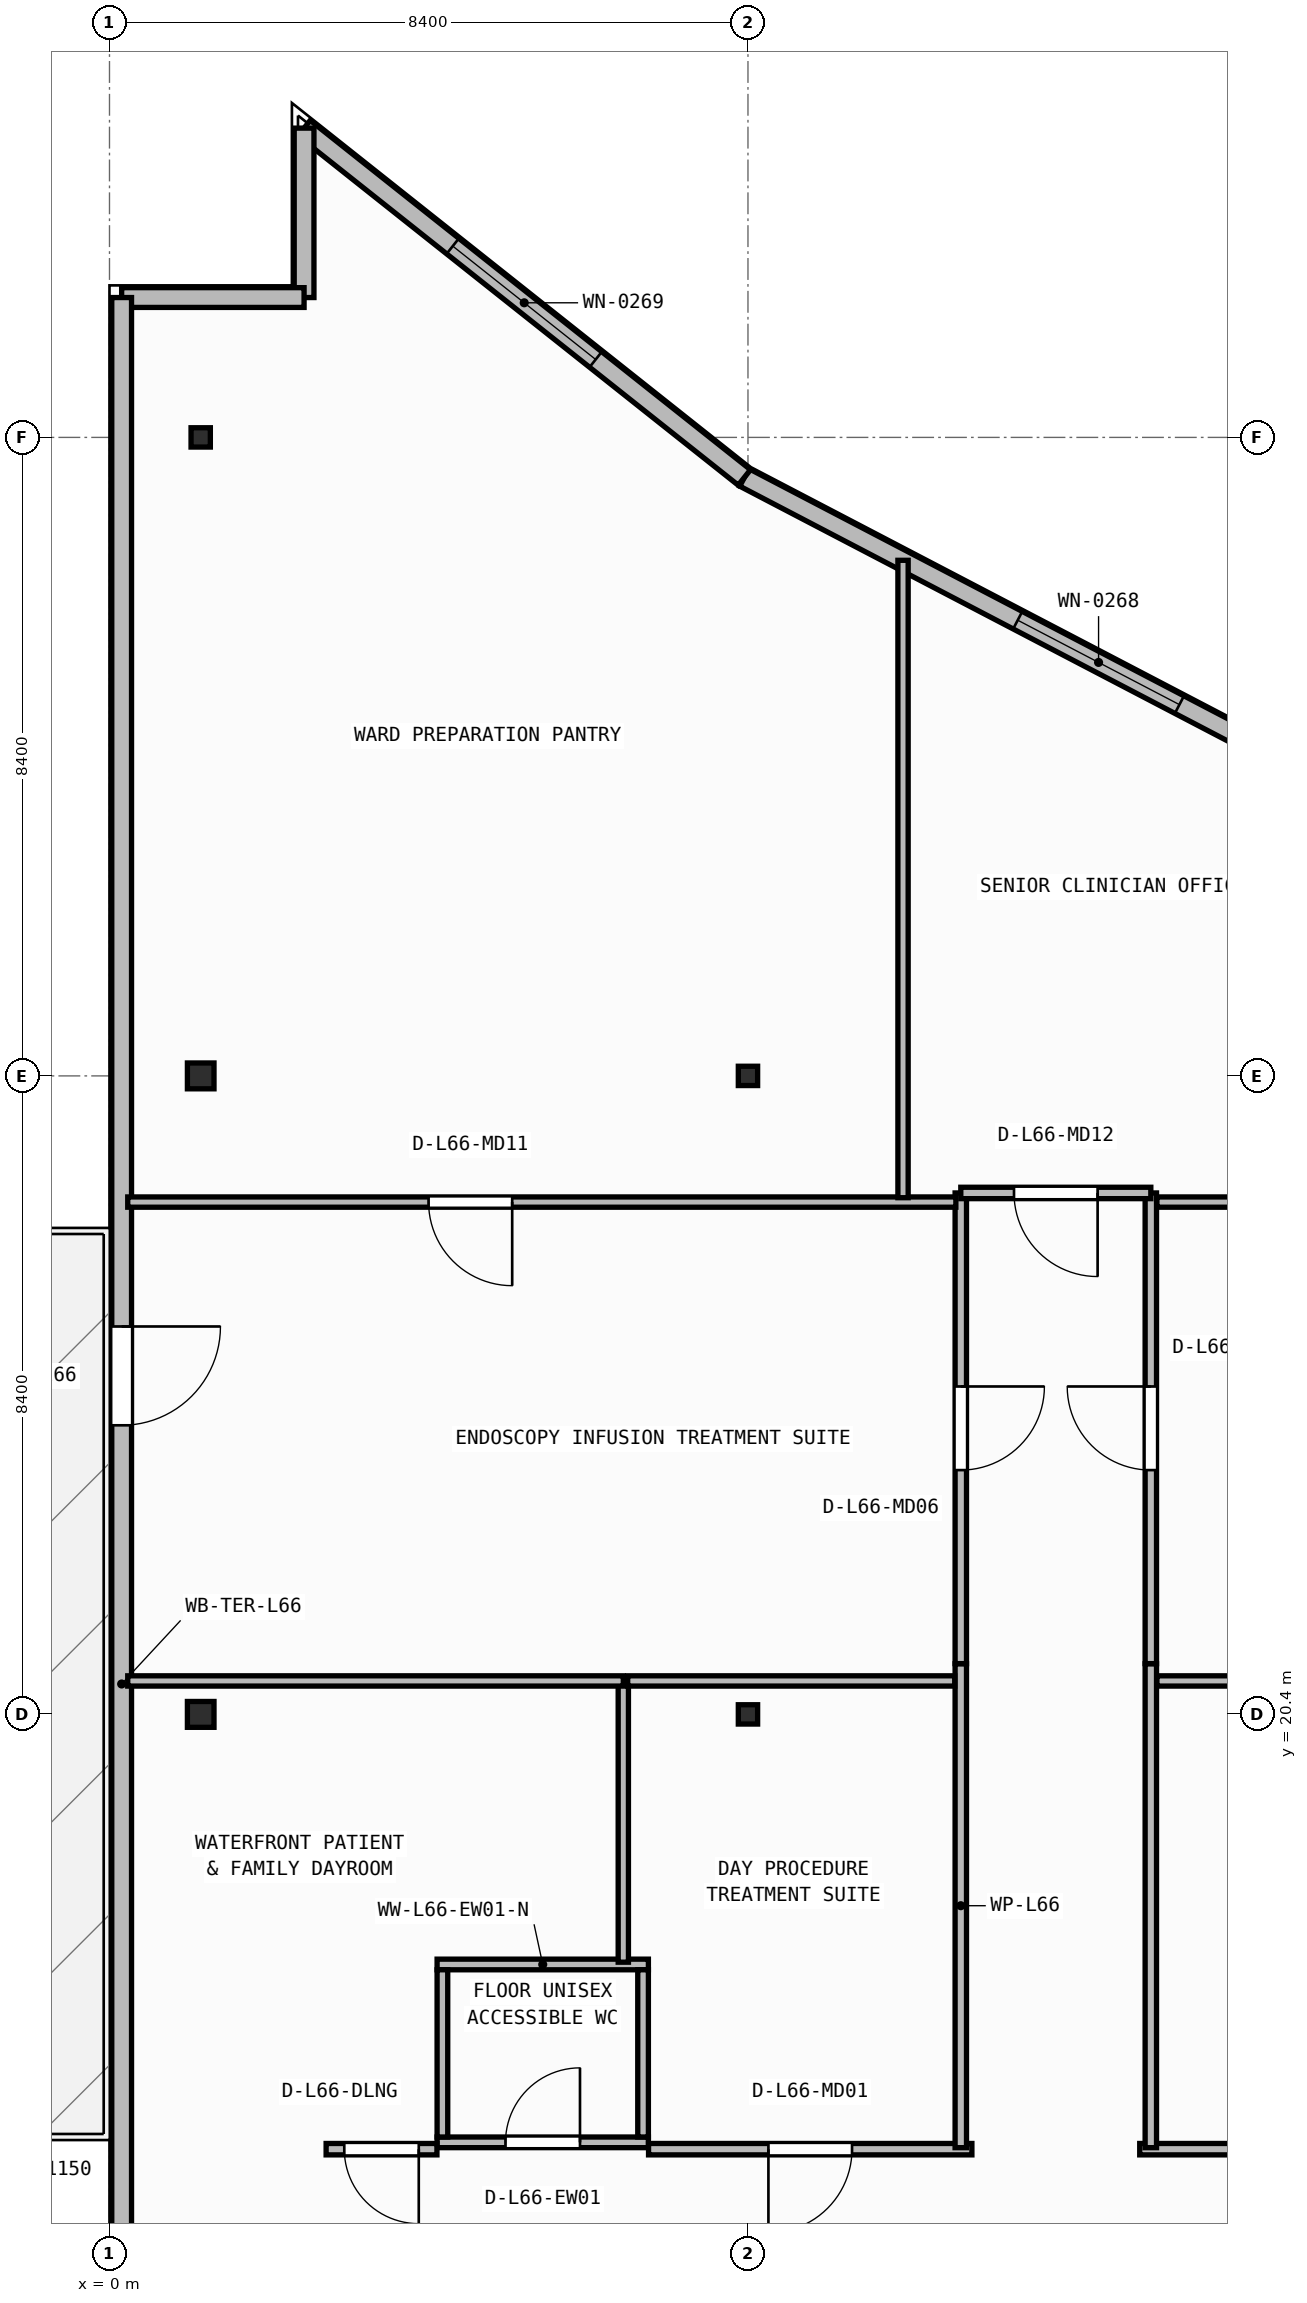
"""IFC4 building model, lengths in metres.
Left out: names, types, materials, properties, quantities, classifications, styles, units other than length and angle.
Written with IfcOpenShell. Run it as: python <this file> out.ifc"""

import sys

from ifc_helpers import new_model, si_unit, direction, frame, frame_2d, origin, origin_2d, place, context, subcontext, project, spatial, rectangle, i_section, extrude, element, fill, save


model = new_model("IFC4")
c1 = context("Model", 3, precision=1e-05, world=origin(), true_north=direction((0.0, 1.0)))
c2 = subcontext(c1, "Body", "Model", "MODEL_VIEW")
j1 = project(units=[si_unit("LENGTHUNIT", "METRE"), si_unit("PLANEANGLEUNIT", "RADIAN")], contexts=[c1])
p1 = place(None, origin())
s1 = spatial("IfcSite", under=j1, at=p1, CompositionType="ELEMENT")
p2 = place(p1, origin())
s2 = spatial("IfcBuilding", under=s1, at=p2, CompositionType="ELEMENT")
p3 = place(p2, frame((0.0, 0.0, 268.4)))
s3 = spatial("IfcBuildingStorey", under=s2, at=p3, CompositionType="ELEMENT", Elevation=268.4)
p4 = place(p3, frame((1.2, 20.4, 0.0), z_axis=(0.0, 0.0, 1.0), x_axis=(1.0, 0.0, 0.0)))
e1 = element("IfcColumn", 1, at=p4, inside=s3, PredefinedType="COLUMN", context=c2, shape_type="SweptSolid", body=[
    extrude(i_section(OverallWidth=0.35, OverallDepth=0.34, WebThickness=0.016, FlangeThickness=0.028, at=origin_2d()), origin(), (0.0, 0.0, 1.0), 3.95),
])
p5 = place(p3, frame((8.4, 20.4, 0.0), z_axis=(0.0, 0.0, 1.0), x_axis=(1.0, 0.0, 0.0)))
e2 = element("IfcColumn", 2, at=p5, inside=s3, PredefinedType="COLUMN", context=c2, shape_type="SweptSolid", body=[
    extrude(i_section(OverallWidth=0.254, OverallDepth=0.254, WebThickness=0.009, FlangeThickness=0.014, FilletRadius=0.013, at=origin_2d()), origin(), (0.0, 0.0, 1.0), 3.95),
])
p6 = place(p3, frame((1.2, 28.8, 0.0), z_axis=(0.0, 0.0, 1.0), x_axis=(1.0, 0.0, 0.0)))
e3 = element("IfcColumn", 3, at=p6, inside=s3, PredefinedType="COLUMN", context=c2, shape_type="SweptSolid", body=[
    extrude(i_section(OverallWidth=0.35, OverallDepth=0.34, WebThickness=0.016, FlangeThickness=0.028, at=origin_2d()), origin(), (0.0, 0.0, 1.0), 3.95),
])
for number, where, z_axis, x_axis in (
    (4, (8.4, 28.8, 0.0), (0.0, 0.0, 1.0), (1.0, 0.0, 0.0)),
    (5, (1.2, 37.2, 0.0), (0.0, 0.0, 1.0), (1.0, 0.0, 0.0)),
):
    element("IfcColumn", number, at=place(p3, frame(where, z_axis=z_axis, x_axis=x_axis)), inside=s3, PredefinedType="COLUMN", context=c2, shape_type="SweptSolid", body=[
        extrude(i_section(OverallWidth=0.254, OverallDepth=0.254, WebThickness=0.009, FlangeThickness=0.014, FilletRadius=0.013, at=origin_2d()), origin(), (0.0, 0.0, 1.0), 3.95),
    ])
p7 = place(p3, frame((17.673, 31.806, 0.0), z_axis=(0.0, 0.0, 1.0), x_axis=(-0.886426635565, 0.462869117311, 0.0)))
e6 = element("IfcWall", 6, at=p7, inside=s3, PredefinedType="STANDARD", context=c2, shape_type="SweptSolid", body=[
    extrude(rectangle(XDim=10.514, YDim=0.26, at=frame_2d((5.257, 0.0))), origin(), (0.0, 0.0, 1.0), 3.71),
])
p8 = place(p7, frame((4.057, 0.0, 0.9)))
e7 = element("IfcOpeningElement", 7, at=p8, cuts=e6, PredefinedType="OPENING", context=c2, shape_type="SweptSolid", body=[
    extrude(rectangle(XDim=2.4, YDim=1.65, at=frame_2d((1.2, 0.825))), frame((0.0, 0.14, 0.0), z_axis=(0.0, -1.0, 0.0), x_axis=(1.0, 0.0, 0.0)), (0.0, 0.0, 1.0), 0.28),
])
p9 = place(p3, frame((8.353, 36.673, 0.0), z_axis=(0.0, 0.0, 1.0), x_axis=(-0.783387911746, 0.621533088203, 0.0)))
e8 = element("IfcWall", 8, at=p9, inside=s3, PredefinedType="STANDARD", context=c2, shape_type="SweptSolid", body=[
    extrude(rectangle(XDim=7.394, YDim=0.26, at=frame_2d((3.697, 0.0))), origin(), (0.0, 0.0, 1.0), 3.71),
])
p10 = place(p9, frame((2.497, 0.0, 0.9)))
e9 = element("IfcOpeningElement", 9, at=p10, cuts=e8, PredefinedType="OPENING", context=c2, shape_type="SweptSolid", body=[
    extrude(rectangle(XDim=2.4, YDim=1.65, at=frame_2d((1.2, 0.825))), frame((0.0, 0.14, 0.0), z_axis=(0.0, -1.0, 0.0), x_axis=(1.0, 0.0, 0.0)), (0.0, 0.0, 1.0), 0.28),
])
p11 = place(p3, frame((2.56, 41.269, 0.0), z_axis=(0.0, 0.0, 1.0), x_axis=(0.0, -1.0, 0.0)))
e10 = element("IfcWall", 10, at=p11, inside=s3, PredefinedType="STANDARD", context=c2, shape_type="SweptSolid", body=[
    extrude(rectangle(XDim=2.229, YDim=0.26, at=frame_2d((1.114, 0.0))), origin(), (0.0, 0.0, 1.0), 3.71),
])
p12 = place(p3, frame((2.56, 39.04, 0.0), z_axis=(0.0, 0.0, 1.0), x_axis=(-1.0, 0.0, 0.0)))
e11 = element("IfcWall", 11, at=p12, inside=s3, PredefinedType="STANDARD", context=c2, shape_type="SweptSolid", body=[
    extrude(rectangle(XDim=2.4, YDim=0.26, at=frame_2d((1.2, 0.0))), origin(), (0.0, 0.0, 1.0), 3.71),
])
p13 = place(p3, frame((0.16, 39.04, 0.0), z_axis=(0.0, 0.0, 1.0), x_axis=(0.0, -1.0, 0.0)))
e12 = element("IfcWall", 12, at=p13, inside=s3, PredefinedType="STANDARD", context=c2, shape_type="SweptSolid", body=[
    extrude(rectangle(XDim=36.48, YDim=0.26, at=frame_2d((18.24, 0.0))), origin(), (0.0, 0.0, 1.0), 3.71),
])
p14 = place(p13, frame((13.537, 0.0, 0.0)))
e13 = element("IfcOpeningElement", 13, at=p14, cuts=e12, PredefinedType="OPENING", context=c2, shape_type="SweptSolid", body=[
    extrude(rectangle(XDim=1.3, YDim=2.15, at=frame_2d((0.65, 1.075))), frame((0.0, 0.14, 0.0), z_axis=(0.0, -1.0, 0.0), x_axis=(1.0, 0.0, 0.0)), (0.0, 0.0, 1.0), 0.28),
])
p15 = place(p3, frame((4.31, 14.77, 0.0), z_axis=(0.0, 0.0, 1.0), x_axis=(1.0, 0.0, 0.0)))
e14 = element("IfcWall", 14, at=p15, inside=s3, PredefinedType="PARTITIONING", context=c2, shape_type="SweptSolid", body=[
    extrude(rectangle(XDim=2.78, YDim=0.14, at=frame_2d((1.39, 0.0))), origin(), (0.0, 0.0, 1.0), 3.71),
])
p16 = place(p15, frame((0.9, 0.0, 0.0)))
e15 = element("IfcOpeningElement", 15, at=p16, cuts=e14, PredefinedType="OPENING", context=c2, shape_type="SweptSolid", body=[
    extrude(rectangle(XDim=0.98, YDim=2.1, at=frame_2d((0.49, 1.05))), frame((0.0, 0.08, 0.0), z_axis=(0.0, -1.0, 0.0), x_axis=(1.0, 0.0, 0.0)), (0.0, 0.0, 1.0), 0.16),
])
p17 = place(p3, frame((4.31, 17.11, 0.0), z_axis=(0.0, 0.0, 1.0), x_axis=(1.0, 0.0, 0.0)))
e16 = element("IfcWall", 16, at=p17, inside=s3, PredefinedType="PARTITIONING", context=c2, shape_type="SweptSolid", body=[
    extrude(rectangle(XDim=2.78, YDim=0.14, at=frame_2d((1.39, 0.0))), origin(), (0.0, 0.0, 1.0), 3.71),
])
for number, where, z_axis, x_axis in (
    (17, (4.38, 14.84, 0.0), (0.0, 0.0, 1.0), (0.0, 1.0, 0.0)),
    (18, (7.02, 14.84, 0.0), (0.0, 0.0, 1.0), (0.0, 1.0, 0.0)),
):
    element("IfcWall", number, at=place(p3, frame(where, z_axis=z_axis, x_axis=x_axis)), inside=s3, PredefinedType="PARTITIONING", context=c2, shape_type="SweptSolid", body=[
        extrude(rectangle(XDim=2.2, YDim=0.14, at=frame_2d((1.1, 0.0))), origin(), (0.0, 0.0, 1.0), 3.71),
    ])
p18 = place(p3, frame((4.308, 14.68, 0.0), z_axis=(0.0, 0.0, 1.0), x_axis=(-1.0, 0.0, 0.0)))
e19 = element("IfcWall", 19, at=p18, inside=s3, PredefinedType="PARTITIONING", context=c2, shape_type="SweptSolid", body=[
    extrude(rectangle(XDim=1.458, YDim=0.15, at=frame_2d((0.729, 0.0))), origin(), (0.0, 0.0, 1.0), 3.71),
])
p19 = place(p18, frame((0.239, 0.0, 0.0)))
e20 = element("IfcOpeningElement", 20, at=p19, cuts=e19, PredefinedType="OPENING", context=c2, shape_type="SweptSolid", body=[
    extrude(rectangle(XDim=0.98, YDim=2.1, at=frame_2d((0.49, 1.05))), frame((0.0, 0.085, 0.0), z_axis=(0.0, -1.0, 0.0), x_axis=(1.0, 0.0, 0.0)), (0.0, 0.0, 1.0), 0.17),
])
p20 = place(p3, frame((11.346, 14.68, 0.0), z_axis=(0.0, 0.0, 1.0), x_axis=(-1.0, 0.0, 0.0)))
e21 = element("IfcWall", 21, at=p20, inside=s3, PredefinedType="PARTITIONING", context=c2, shape_type="SweptSolid", body=[
    extrude(rectangle(XDim=4.254, YDim=0.15, at=frame_2d((2.127, 0.0))), origin(), (0.0, 0.0, 1.0), 3.71),
])
p21 = place(p20, frame((1.577, 0.0, 0.0)))
e22 = element("IfcOpeningElement", 22, at=p21, cuts=e21, PredefinedType="OPENING", context=c2, shape_type="SweptSolid", body=[
    extrude(rectangle(XDim=1.1, YDim=2.1, at=frame_2d((0.55, 1.05))), frame((0.0, 0.085, 0.0), z_axis=(0.0, -1.0, 0.0), x_axis=(1.0, 0.0, 0.0)), (0.0, 0.0, 1.0), 0.17),
])
p22 = place(p3, frame((20.316, 14.68, 0.0), z_axis=(0.0, 0.0, 1.0), x_axis=(-1.0, 0.0, 0.0)))
e23 = element("IfcWall", 23, at=p22, inside=s3, PredefinedType="PARTITIONING", context=c2, shape_type="SweptSolid", body=[
    extrude(rectangle(XDim=6.762, YDim=0.15, at=frame_2d((3.381, 0.0))), origin(), (0.0, 0.0, 1.0), 3.71),
])
p23 = place(p22, frame((2.831, 0.0, 0.0)))
e24 = element("IfcOpeningElement", 24, at=p23, cuts=e23, PredefinedType="OPENING", context=c2, shape_type="SweptSolid", body=[
    extrude(rectangle(XDim=1.1, YDim=2.1, at=frame_2d((0.55, 1.05))), frame((0.0, 0.085, 0.0), z_axis=(0.0, -1.0, 0.0), x_axis=(1.0, 0.0, 0.0)), (0.0, 0.0, 1.0), 0.17),
])
for number, where, z_axis, x_axis in (
    (25, (11.2, 21.066, 0.0), (0.0, 0.0, 1.0), (0.0, -1.0, 0.0)),
    (26, (13.7, 14.7, 0.0), (0.0, 0.0, 1.0), (0.0, 1.0, 0.0)),
):
    element("IfcWall", number, at=place(p3, frame(where, z_axis=z_axis, x_axis=x_axis)), inside=s3, PredefinedType="PARTITIONING", context=c2, shape_type="SweptSolid", body=[
        extrude(rectangle(XDim=6.366, YDim=0.15, at=frame_2d((3.183, 0.0))), origin(), (0.0, 0.0, 1.0), 3.71),
    ])
p24 = place(p3, frame((11.2, 27.26, 0.0), z_axis=(0.0, 0.0, 1.0), x_axis=(0.0, -1.0, 0.0)))
e27 = element("IfcWall", 27, at=p24, inside=s3, PredefinedType="PARTITIONING", context=c2, shape_type="SweptSolid", body=[
    extrude(rectangle(XDim=6.192, YDim=0.15, at=frame_2d((3.096, 0.0))), origin(), (0.0, 0.0, 1.0), 3.71),
])
p25 = place(p24, frame((2.546, 0.0, 0.0)))
e28 = element("IfcOpeningElement", 28, at=p25, cuts=e27, PredefinedType="OPENING", context=c2, shape_type="SweptSolid", body=[
    extrude(rectangle(XDim=1.1, YDim=2.1, at=frame_2d((0.55, 1.05))), frame((0.0, 0.085, 0.0), z_axis=(0.0, -1.0, 0.0), x_axis=(1.0, 0.0, 0.0)), (0.0, 0.0, 1.0), 0.17),
])
p26 = place(p3, frame((13.7, 21.068, 0.0), z_axis=(0.0, 0.0, 1.0), x_axis=(0.0, 1.0, 0.0)))
e29 = element("IfcWall", 29, at=p26, inside=s3, PredefinedType="PARTITIONING", context=c2, shape_type="SweptSolid", body=[
    extrude(rectangle(XDim=6.192, YDim=0.15, at=frame_2d((3.096, 0.0))), origin(), (0.0, 0.0, 1.0), 3.71),
])
p27 = place(p26, frame((2.546, 0.0, 0.0)))
e30 = element("IfcOpeningElement", 30, at=p27, cuts=e29, PredefinedType="OPENING", context=c2, shape_type="SweptSolid", body=[
    extrude(rectangle(XDim=1.1, YDim=2.1, at=frame_2d((0.55, 1.05))), frame((0.0, 0.085, 0.0), z_axis=(0.0, -1.0, 0.0), x_axis=(1.0, 0.0, 0.0)), (0.0, 0.0, 1.0), 0.17),
])
p28 = place(p3, frame((13.7, 27.26, 0.0), z_axis=(0.0, 0.0, 1.0), x_axis=(-1.0, 0.0, 0.0)))
e31 = element("IfcWall", 31, at=p28, inside=s3, PredefinedType="PARTITIONING", context=c2, shape_type="SweptSolid", body=[
    extrude(rectangle(XDim=2.5, YDim=0.15, at=frame_2d((1.25, 0.0))), origin(), (0.0, 0.0, 1.0), 3.71),
])
p29 = place(p28, frame((0.7, 0.0, 0.0)))
e32 = element("IfcOpeningElement", 32, at=p29, cuts=e31, PredefinedType="OPENING", context=c2, shape_type="SweptSolid", body=[
    extrude(rectangle(XDim=1.1, YDim=2.1, at=frame_2d((0.55, 1.05))), frame((0.0, 0.085, 0.0), z_axis=(0.0, -1.0, 0.0), x_axis=(1.0, 0.0, 0.0)), (0.0, 0.0, 1.0), 0.17),
])
p30 = place(p3, frame((6.76, 17.14, 0.0), z_axis=(0.0, 0.0, 1.0), x_axis=(0.0, 1.0, 0.0)))
e33 = element("IfcWall", 33, at=p30, inside=s3, PredefinedType="PARTITIONING", context=c2, shape_type="SweptSolid", body=[
    extrude(rectangle(XDim=3.7, YDim=0.135, at=frame_2d((1.85, 0.0))), origin(), (0.0, 0.0, 1.0), 3.71),
])
p31 = place(p3, frame((6.76, 20.84, 0.0), z_axis=(0.0, 0.0, 1.0), x_axis=(-1.0, 0.0, 0.0)))
e34 = element("IfcWall", 34, at=p31, inside=s3, PredefinedType="PARTITIONING", context=c2, shape_type="SweptSolid", body=[
    extrude(rectangle(XDim=6.52, YDim=0.135, at=frame_2d((3.26, 0.0))), origin(), (0.0, 0.0, 1.0), 3.157),
])
p32 = place(p3, frame((11.12, 20.84, 0.0), z_axis=(0.0, 0.0, 1.0), x_axis=(-1.0, 0.0, 0.0)))
e35 = element("IfcWall", 35, at=p32, inside=s3, PredefinedType="PARTITIONING", context=c2, shape_type="SweptSolid", body=[
    extrude(rectangle(XDim=4.303, YDim=0.135, at=frame_2d((2.151, 0.0))), origin(), (0.0, 0.0, 1.0), 3.157),
])
p33 = place(p3, frame((20.09, 20.84, 0.0), z_axis=(0.0, 0.0, 1.0), x_axis=(-1.0, 0.0, 0.0)))
e36 = element("IfcWall", 36, at=p33, inside=s3, PredefinedType="PARTITIONING", context=c2, shape_type="SweptSolid", body=[
    extrude(rectangle(XDim=6.31, YDim=0.135, at=frame_2d((3.155, 0.0))), origin(), (0.0, 0.0, 1.0), 3.157),
])
p34 = place(p3, frame((11.135, 27.14, 0.0), z_axis=(0.0, 0.0, 1.0), x_axis=(-1.0, 0.0, 0.0)))
e37 = element("IfcWall", 37, at=p34, inside=s3, PredefinedType="PARTITIONING", context=c2, shape_type="SweptSolid", body=[
    extrude(rectangle(XDim=10.895, YDim=0.135, at=frame_2d((5.448, 0.0))), origin(), (0.0, 0.0, 1.0), 3.71),
])
p35 = place(p34, frame((5.837, 0.0, 0.0)))
e38 = element("IfcOpeningElement", 38, at=p35, cuts=e37, PredefinedType="OPENING", context=c2, shape_type="SweptSolid", body=[
    extrude(rectangle(XDim=1.1, YDim=2.1, at=frame_2d((0.55, 1.05))), frame((0.0, 0.077, 0.0), z_axis=(0.0, -1.0, 0.0), x_axis=(1.0, 0.0, 0.0)), (0.0, 0.0, 1.0), 0.155),
])
p36 = place(p3, frame((23.64, 27.14, 0.0), z_axis=(0.0, 0.0, 1.0), x_axis=(-1.0, 0.0, 0.0)))
e39 = element("IfcWall", 39, at=p36, inside=s3, PredefinedType="PARTITIONING", context=c2, shape_type="SweptSolid", body=[
    extrude(rectangle(XDim=9.86, YDim=0.135, at=frame_2d((4.93, 0.0))), origin(), (0.0, 0.0, 1.0), 3.71),
])
p37 = place(p3, frame((10.44, 27.198, 0.0), z_axis=(0.0, 0.0, 1.0), x_axis=(0.0, 1.0, 0.0)))
e40 = element("IfcWall", 40, at=p37, inside=s3, PredefinedType="PARTITIONING", context=c2, shape_type="SweptSolid", body=[
    extrude(rectangle(XDim=8.385, YDim=0.135, at=frame_2d((4.193, 0.0))), origin(), (0.0, 0.0, 1.0), 3.71),
])
p38 = place(p8, origin())
e41 = element("IfcWindow", 41, at=p38, inside=s3, PartitioningType="SINGLE_PANEL", PredefinedType="WINDOW", context=c2, shape_type="SweptSolid", body=[
    extrude(rectangle(XDim=2.4, YDim=1.65, at=frame_2d((1.2, 0.825))), frame((0.0, 0.03, 0.0), z_axis=(0.0, -1.0, 0.0), x_axis=(1.0, 0.0, 0.0)), (0.0, 0.0, 1.0), 0.06),
])
fill(e7, e41)
p39 = place(p10, origin())
e42 = element("IfcWindow", 42, at=p39, inside=s3, PartitioningType="SINGLE_PANEL", PredefinedType="WINDOW", context=c2, shape_type="SweptSolid", body=[
    extrude(rectangle(XDim=2.4, YDim=1.65, at=frame_2d((1.2, 0.825))), frame((0.0, 0.03, 0.0), z_axis=(0.0, -1.0, 0.0), x_axis=(1.0, 0.0, 0.0)), (0.0, 0.0, 1.0), 0.06),
])
fill(e9, e42)
p40 = place(p14, origin())
e43 = element("IfcDoor", 43, at=p40, inside=s3, OperationType="SINGLE_SWING_LEFT", PredefinedType="DOOR", context=c2, shape_type="SweptSolid", body=[
    extrude(rectangle(XDim=1.3, YDim=2.15, at=frame_2d((0.65, 1.075))), frame((0.0, 0.025, 0.0), z_axis=(0.0, -1.0, 0.0), x_axis=(1.0, 0.0, 0.0)), (0.0, 0.0, 1.0), 0.05),
])
fill(e13, e43)
p41 = place(p16, origin())
e44 = element("IfcDoor", 44, at=p41, inside=s3, OperationType="SINGLE_SWING_RIGHT", PredefinedType="DOOR", context=c2, shape_type="SweptSolid", body=[
    extrude(rectangle(XDim=0.98, YDim=2.1, at=frame_2d((0.49, 1.05))), frame((0.0, 0.025, 0.0), z_axis=(0.0, -1.0, 0.0), x_axis=(1.0, 0.0, 0.0)), (0.0, 0.0, 1.0), 0.05),
])
fill(e15, e44)
p42 = place(p19, origin())
e45 = element("IfcDoor", 45, at=p42, inside=s3, OperationType="SINGLE_SWING_LEFT", PredefinedType="DOOR", context=c2, shape_type="SweptSolid", body=[
    extrude(rectangle(XDim=0.98, YDim=2.1, at=frame_2d((0.49, 1.05))), frame((0.0, 0.025, 0.0), z_axis=(0.0, -1.0, 0.0), x_axis=(1.0, 0.0, 0.0)), (0.0, 0.0, 1.0), 0.05),
])
fill(e20, e45)
p43 = place(p21, origin())
e46 = element("IfcDoor", 46, at=p43, inside=s3, OperationType="SINGLE_SWING_RIGHT", PredefinedType="DOOR", context=c2, shape_type="SweptSolid", body=[
    extrude(rectangle(XDim=1.1, YDim=2.1, at=frame_2d((0.55, 1.05))), frame((0.0, 0.025, 0.0), z_axis=(0.0, -1.0, 0.0), x_axis=(1.0, 0.0, 0.0)), (0.0, 0.0, 1.0), 0.05),
])
fill(e22, e46)
p44 = place(p25, origin())
e47 = element("IfcDoor", 47, at=p44, inside=s3, OperationType="SINGLE_SWING_LEFT", PredefinedType="DOOR", context=c2, shape_type="SweptSolid", body=[
    extrude(rectangle(XDim=1.1, YDim=2.1, at=frame_2d((0.55, 1.05))), frame((0.0, 0.025, 0.0), z_axis=(0.0, -1.0, 0.0), x_axis=(1.0, 0.0, 0.0)), (0.0, 0.0, 1.0), 0.05),
])
fill(e28, e47)
p45 = place(p27, origin())
e48 = element("IfcDoor", 48, at=p45, inside=s3, OperationType="SINGLE_SWING_RIGHT", PredefinedType="DOOR", context=c2, shape_type="SweptSolid", body=[
    extrude(rectangle(XDim=1.1, YDim=2.1, at=frame_2d((0.55, 1.05))), frame((0.0, 0.025, 0.0), z_axis=(0.0, -1.0, 0.0), x_axis=(1.0, 0.0, 0.0)), (0.0, 0.0, 1.0), 0.05),
])
fill(e30, e48)
p46 = place(p29, origin())
e49 = element("IfcDoor", 49, at=p46, inside=s3, OperationType="SINGLE_SWING_LEFT", PredefinedType="DOOR", context=c2, shape_type="SweptSolid", body=[
    extrude(rectangle(XDim=1.1, YDim=2.1, at=frame_2d((0.55, 1.05))), frame((0.0, 0.025, 0.0), z_axis=(0.0, -1.0, 0.0), x_axis=(1.0, 0.0, 0.0)), (0.0, 0.0, 1.0), 0.05),
])
fill(e32, e49)
p47 = place(p35, origin())
e50 = element("IfcDoor", 50, at=p47, inside=s3, OperationType="SINGLE_SWING_LEFT", PredefinedType="DOOR", context=c2, shape_type="SweptSolid", body=[
    extrude(rectangle(XDim=1.1, YDim=2.1, at=frame_2d((0.55, 1.05))), frame((0.0, 0.025, 0.0), z_axis=(0.0, -1.0, 0.0), x_axis=(1.0, 0.0, 0.0)), (0.0, 0.0, 1.0), 0.05),
])
fill(e38, e50)
save(model, sys.argv[1])
